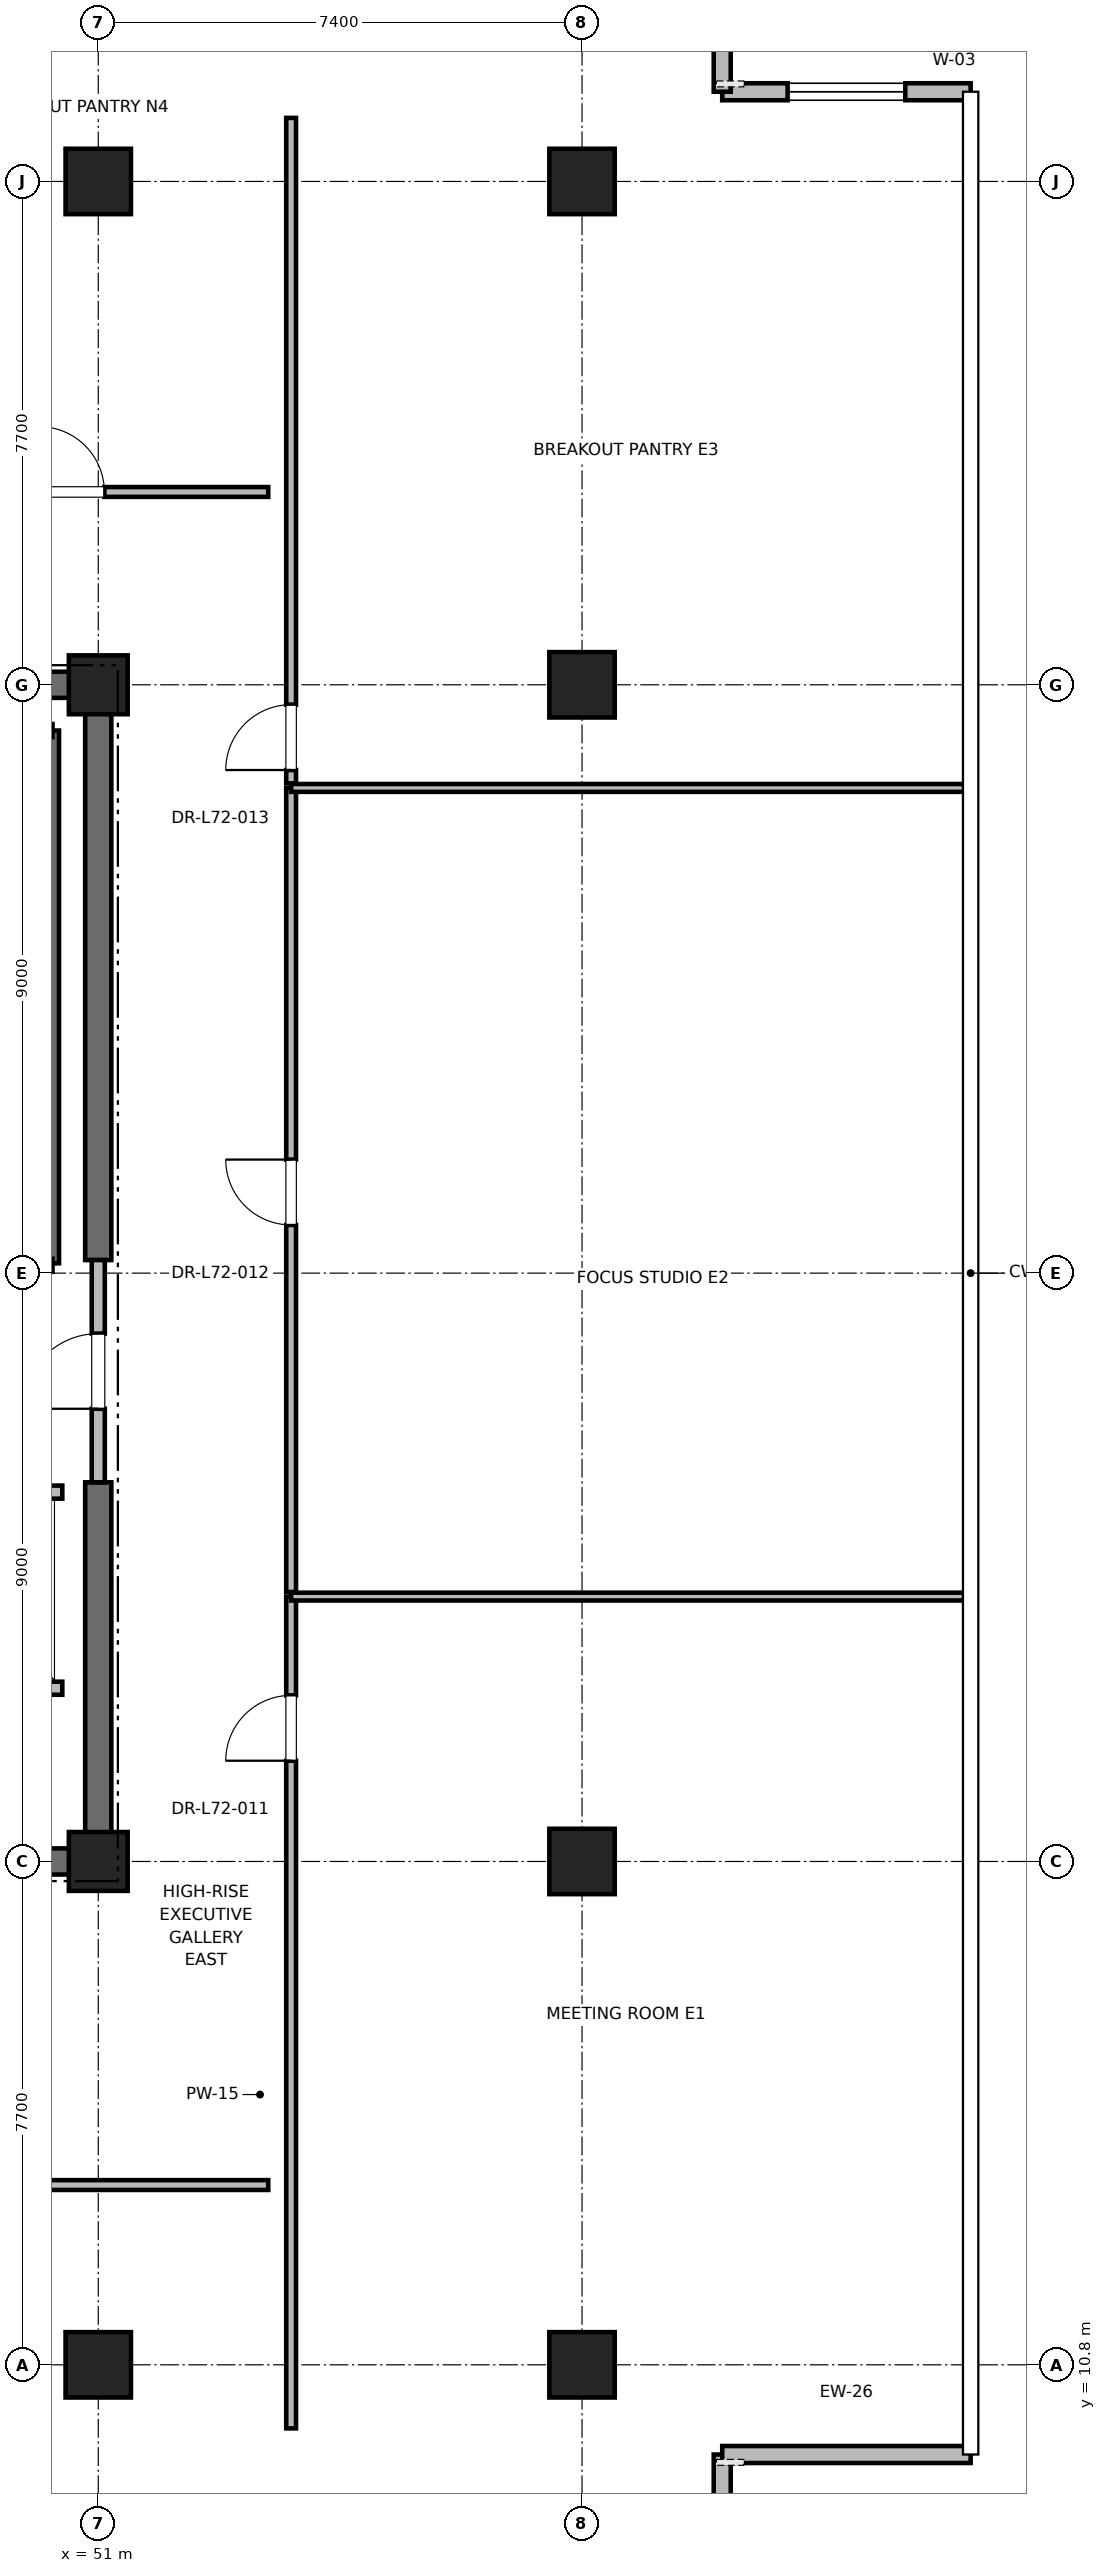
"""IFC4 building model, lengths in metres.
Left out: names, types, materials, properties, quantities, classifications, styles, units other than length and angle.
Written with IfcOpenShell. Run it as: python <this file> out.ifc"""

import sys

from ifc_helpers import new_model, si_unit, direction, frame, frame_2d, origin, origin_2d, place, context, subcontext, project, spatial, rectangle, extrude, element, fill, save


model = new_model("IFC4")
c1 = context("Model", 3, precision=1e-05, world=origin(), true_north=direction((0.0, 1.0)))
c2 = subcontext(c1, "Body", "Model", "MODEL_VIEW")
j1 = project(units=[si_unit("LENGTHUNIT", "METRE"), si_unit("PLANEANGLEUNIT", "RADIAN")], contexts=[c1])
p1 = place(None, origin())
s1 = spatial("IfcSite", under=j1, at=p1, CompositionType="ELEMENT")
p2 = place(p1, origin())
s2 = spatial("IfcBuilding", under=s1, at=p2, CompositionType="ELEMENT")
p3 = place(p2, frame((0.0, 0.0, 310.8)))
s3 = spatial("IfcBuildingStorey", under=s2, at=p3, CompositionType="ELEMENT", Elevation=310.8)
for number, where, z_axis, x_axis in (
    (1, (51.0, 10.8, 0.0), (0.0, 0.0, 1.0), (1.0, 0.0, 0.0)),
    (2, (51.0, 44.2, 0.0), (0.0, 0.0, 1.0), (1.0, 0.0, 0.0)),
    (3, (58.4, 18.5, 0.0), (0.0, 0.0, 1.0), (1.0, 0.0, 0.0)),
    (4, (58.4, 36.5, 0.0), (0.0, 0.0, 1.0), (1.0, 0.0, 0.0)),
    (5, (58.4, 10.8, 0.0), (0.0, 0.0, 1.0), (1.0, 0.0, 0.0)),
    (6, (58.4, 44.2, 0.0), (0.0, 0.0, 1.0), (1.0, 0.0, 0.0)),
):
    element("IfcColumn", number, at=place(p3, frame(where, z_axis=z_axis, x_axis=x_axis)), inside=s3, PredefinedType="COLUMN", context=c2, shape_type="SweptSolid", body=[
        extrude(rectangle(XDim=1.0, YDim=1.0, at=origin_2d()), origin(), (0.0, 0.0, 1.0), 4.0),
    ])
for number, where, z_axis, x_axis in (
    (7, (51.0, 18.5, 0.0), (0.0, 0.0, 1.0), (1.0, 0.0, 0.0)),
    (8, (51.0, 36.5, 0.0), (0.0, 0.0, 1.0), (1.0, 0.0, 0.0)),
):
    element("IfcColumn", number, at=place(p3, frame(where, z_axis=z_axis, x_axis=x_axis)), inside=s3, PredefinedType="PILASTER", context=c2, shape_type="SweptSolid", body=[
        extrude(rectangle(XDim=0.9, YDim=0.9, at=origin_2d()), origin(), (0.0, 0.0, 1.0), 4.0),
    ])
p4 = place(p3, frame((41.8, 18.5, 0.0), z_axis=(0.0, 0.0, 1.0), x_axis=(1.0, 0.0, 0.0)))
e9 = element("IfcWall", 9, at=p4, inside=s3, PredefinedType="SHEAR", context=c2, shape_type="SweptSolid", body=[
    extrude(rectangle(XDim=9.2, YDim=0.4, at=frame_2d((4.6, 0.0))), origin(), (0.0, 0.0, 1.0), 3.785),
])
for number, where, z_axis, x_axis in (
    (10, (45.2, 36.5, 0.0), (0.0, 0.0, 1.0), (1.0, 0.0, 0.0)),
    (11, (51.0, 18.5, 0.0), (0.0, 0.0, 1.0), (0.0, 1.0, 0.0)),
):
    element("IfcWall", number, at=place(p3, frame(where, z_axis=z_axis, x_axis=x_axis)), inside=s3, PredefinedType="SHEAR", context=c2, shape_type="SweptSolid", body=[
        extrude(rectangle(XDim=5.8, YDim=0.4, at=frame_2d((2.9, 0.0))), origin(), (0.0, 0.0, 1.0), 3.785),
    ])
p5 = place(p3, frame((51.0, 27.7, 0.0), z_axis=(0.0, 0.0, 1.0), x_axis=(0.0, 1.0, 0.0)))
e12 = element("IfcWall", 12, at=p5, inside=s3, PredefinedType="SHEAR", context=c2, shape_type="SweptSolid", body=[
    extrude(rectangle(XDim=8.8, YDim=0.4, at=frame_2d((4.4, 0.0))), origin(), (0.0, 0.0, 1.0), 3.785),
])
p6 = place(p3, frame((60.544, 6.128, 0.0), z_axis=(0.0, 0.0, 1.0), x_axis=(0.0, 1.0, 0.0)))
e13 = element("IfcWall", 13, at=p6, inside=s3, PredefinedType="PARAPET", context=c2, shape_type="SweptSolid", body=[
    extrude(rectangle(XDim=3.3, YDim=0.26, at=frame_2d((1.65, 0.0))), origin(), (0.0, 0.0, 1.0), 3.785),
])
p7 = place(p6, frame((0.75, 0.0, 0.85)))
e14 = element("IfcOpeningElement", 14, at=p7, cuts=e13, PredefinedType="OPENING", context=c2, shape_type="SweptSolid", body=[
    extrude(rectangle(XDim=1.8, YDim=2.2, at=frame_2d((0.9, 1.1))), frame((0.0, 0.13, 0.0), z_axis=(0.0, -1.0, 0.0), x_axis=(1.0, 0.0, 0.0)), (0.0, 0.0, 1.0), 0.26),
])
p8 = place(p3, frame((60.544, 9.428, 0.0), z_axis=(0.0, 0.0, 1.0), x_axis=(1.0, 0.0, 0.0)))
e15 = element("IfcWall", 15, at=p8, inside=s3, PredefinedType="PARAPET", context=c2, shape_type="SweptSolid", body=[
    extrude(rectangle(XDim=3.8, YDim=0.26, at=frame_2d((1.9, 0.0))), origin(), (0.0, 0.0, 1.0), 3.785),
])
p9 = place(p3, frame((64.344, 45.572, 0.0), z_axis=(0.0, 0.0, 1.0), x_axis=(-1.0, 0.0, 0.0)))
e16 = element("IfcWall", 16, at=p9, inside=s3, PredefinedType="PARAPET", context=c2, shape_type="SweptSolid", body=[
    extrude(rectangle(XDim=3.8, YDim=0.26, at=frame_2d((1.9, 0.0))), origin(), (0.0, 0.0, 1.0), 3.785),
])
p10 = place(p9, frame((1.0, 0.0, 0.85)))
e17 = element("IfcOpeningElement", 17, at=p10, cuts=e16, PredefinedType="OPENING", context=c2, shape_type="SweptSolid", body=[
    extrude(rectangle(XDim=1.8, YDim=2.2, at=frame_2d((0.9, 1.1))), frame((0.0, 0.13, 0.0), z_axis=(0.0, -1.0, 0.0), x_axis=(1.0, 0.0, 0.0)), (0.0, 0.0, 1.0), 0.26),
])
p11 = place(p3, frame((60.544, 45.572, 0.0), z_axis=(0.0, 0.0, 1.0), x_axis=(0.0, 1.0, 0.0)))
e18 = element("IfcWall", 18, at=p11, inside=s3, PredefinedType="PARAPET", context=c2, shape_type="SweptSolid", body=[
    extrude(rectangle(XDim=3.3, YDim=0.26, at=frame_2d((1.65, 0.0))), origin(), (0.0, 0.0, 1.0), 3.785),
])
p12 = place(p3, frame((50.3, 27.65, 0.0), z_axis=(0.0, 0.0, 1.0), x_axis=(0.0, 1.0, 0.0)))
e19 = element("IfcWall", 19, at=p12, inside=s3, PredefinedType="SOLIDWALL", context=c2, shape_type="SweptSolid", body=[
    extrude(rectangle(XDim=8.15, YDim=0.2, at=frame_2d((4.075, 0.0))), origin(), (0.0, 0.0, 1.0), 3.785),
])
p13 = place(p3, frame((51.0, 24.3, 0.0), z_axis=(0.0, 0.0, 1.0), x_axis=(0.0, 1.0, 0.0)))
e20 = element("IfcWall", 20, at=p13, inside=s3, PredefinedType="PARTITIONING", context=c2, shape_type="SweptSolid", body=[
    extrude(rectangle(XDim=3.4, YDim=0.2, at=frame_2d((1.7, 0.0))), origin(), (0.0, 0.0, 1.0), 2.865),
])
p14 = place(p13, frame((1.125, 0.0, 0.0)))
e21 = element("IfcOpeningElement", 21, at=p14, cuts=e20, PredefinedType="OPENING", context=c2, shape_type="SweptSolid", body=[
    extrude(rectangle(XDim=1.15, YDim=2.2, at=frame_2d((0.575, 1.1))), frame((0.0, 0.1, 0.0), z_axis=(0.0, -1.0, 0.0), x_axis=(1.0, 0.0, 0.0)), (0.0, 0.0, 1.0), 0.2),
])
p15 = place(p3, frame((47.85, 21.15, 0.0), z_axis=(0.0, 0.0, 1.0), x_axis=(1.0, 0.0, 0.0)))
e22 = element("IfcWall", 22, at=p15, inside=s3, PredefinedType="SOLIDWALL", context=c2, shape_type="SweptSolid", body=[
    extrude(rectangle(XDim=2.6, YDim=0.2, at=frame_2d((1.3, 0.0))), origin(), (0.0, 0.0, 1.0), 3.785),
])
p16 = place(p3, frame((50.45, 24.15, 0.0), z_axis=(0.0, 0.0, 1.0), x_axis=(-1.0, 0.0, 0.0)))
e23 = element("IfcWall", 23, at=p16, inside=s3, PredefinedType="SOLIDWALL", context=c2, shape_type="SweptSolid", body=[
    extrude(rectangle(XDim=2.6, YDim=0.2, at=frame_2d((1.3, 0.0))), origin(), (0.0, 0.0, 1.0), 2.865),
])
p17 = place(p16, frame((0.75, 0.0, 0.0)))
e24 = element("IfcOpeningElement", 24, at=p17, cuts=e23, PredefinedType="OPENING", context=c2, shape_type="SweptSolid", body=[
    extrude(rectangle(XDim=1.1, YDim=2.2, at=frame_2d((0.55, 1.1))), frame((0.0, 0.1, 0.0), z_axis=(0.0, -1.0, 0.0), x_axis=(1.0, 0.0, 0.0)), (0.0, 0.0, 1.0), 0.2),
])
p18 = place(p3, frame((47.686, 39.45, 0.0), z_axis=(0.0, 0.0, 1.0), x_axis=(1.0, 0.0, 0.0)))
e25 = element("IfcWall", 25, at=p18, inside=s3, PredefinedType="PARTITIONING", context=c2, shape_type="SweptSolid", body=[
    extrude(rectangle(XDim=5.914, YDim=0.15, at=frame_2d((2.957, 0.0))), origin(), (0.0, 0.0, 1.0), 2.85),
])
p19 = place(p18, frame((2.407, 0.0, 0.0)))
e26 = element("IfcOpeningElement", 26, at=p19, cuts=e25, PredefinedType="OPENING", context=c2, shape_type="SweptSolid", body=[
    extrude(rectangle(XDim=1.0, YDim=2.15, at=frame_2d((0.5, 1.075))), frame((0.0, 0.075, 0.0), z_axis=(0.0, -1.0, 0.0), x_axis=(1.0, 0.0, 0.0)), (0.0, 0.0, 1.0), 0.15),
])
p20 = place(p3, frame((38.438, 13.55, 0.0), z_axis=(0.0, 0.0, 1.0), x_axis=(1.0, 0.0, 0.0)))
e27 = element("IfcWall", 27, at=p20, inside=s3, PredefinedType="PARTITIONING", context=c2, shape_type="SweptSolid", body=[
    extrude(rectangle(XDim=15.162, YDim=0.15, at=frame_2d((7.581, 0.0))), origin(), (0.0, 0.0, 1.0), 2.85),
])
p21 = place(p20, frame((7.031, 0.0, 0.0)))
e28 = element("IfcOpeningElement", 28, at=p21, cuts=e27, PredefinedType="OPENING", context=c2, shape_type="SweptSolid", body=[
    extrude(rectangle(XDim=1.0, YDim=2.15, at=frame_2d((0.5, 1.075))), frame((0.0, 0.075, 0.0), z_axis=(0.0, -1.0, 0.0), x_axis=(1.0, 0.0, 0.0)), (0.0, 0.0, 1.0), 0.15),
])
p22 = place(p3, frame((53.95, 9.828, 0.0), z_axis=(0.0, 0.0, 1.0), x_axis=(0.0, 1.0, 0.0)))
e29 = element("IfcWall", 29, at=p22, inside=s3, PredefinedType="PARTITIONING", context=c2, shape_type="SweptSolid", body=[
    extrude(rectangle(XDim=12.724, YDim=0.15, at=frame_2d((6.362, 0.0))), origin(), (0.0, 0.0, 1.0), 2.85),
])
p23 = place(p22, frame((10.213, 0.0, 0.0)))
e30 = element("IfcOpeningElement", 30, at=p23, cuts=e29, PredefinedType="OPENING", context=c2, shape_type="SweptSolid", body=[
    extrude(rectangle(XDim=1.0, YDim=2.15, at=frame_2d((0.5, 1.075))), frame((0.0, 0.075, 0.0), z_axis=(0.0, -1.0, 0.0), x_axis=(1.0, 0.0, 0.0)), (0.0, 0.0, 1.0), 0.15),
])
p24 = place(p3, frame((53.95, 22.552, 0.0), z_axis=(0.0, 0.0, 1.0), x_axis=(1.0, 0.0, 0.0)))
e31 = element("IfcWall", 31, at=p24, inside=s3, PredefinedType="PARTITIONING", context=c2, shape_type="SweptSolid", body=[
    extrude(rectangle(XDim=10.294, YDim=0.12, at=frame_2d((5.147, 0.0))), origin(), (0.0, 0.0, 1.0), 2.85),
])
p25 = place(p3, frame((53.95, 22.622, 0.0), z_axis=(0.0, 0.0, 1.0), x_axis=(0.0, 1.0, 0.0)))
e32 = element("IfcWall", 32, at=p25, inside=s3, PredefinedType="PARTITIONING", context=c2, shape_type="SweptSolid", body=[
    extrude(rectangle(XDim=12.301, YDim=0.15, at=frame_2d((6.15, 0.0))), origin(), (0.0, 0.0, 1.0), 2.85),
])
p26 = place(p25, frame((5.615, 0.0, 0.0)))
e33 = element("IfcOpeningElement", 33, at=p26, cuts=e32, PredefinedType="OPENING", context=c2, shape_type="SweptSolid", body=[
    extrude(rectangle(XDim=1.0, YDim=2.15, at=frame_2d((0.5, 1.075))), frame((0.0, 0.075, 0.0), z_axis=(0.0, -1.0, 0.0), x_axis=(1.0, 0.0, 0.0)), (0.0, 0.0, 1.0), 0.15),
])
p27 = place(p3, frame((53.95, 34.922, 0.0), z_axis=(0.0, 0.0, 1.0), x_axis=(1.0, 0.0, 0.0)))
e34 = element("IfcWall", 34, at=p27, inside=s3, PredefinedType="PARTITIONING", context=c2, shape_type="SweptSolid", body=[
    extrude(rectangle(XDim=10.294, YDim=0.12, at=frame_2d((5.147, 0.0))), origin(), (0.0, 0.0, 1.0), 2.85),
])
p28 = place(p3, frame((53.95, 34.992, 0.0), z_axis=(0.0, 0.0, 1.0), x_axis=(0.0, 1.0, 0.0)))
e35 = element("IfcWall", 35, at=p28, inside=s3, PredefinedType="PARTITIONING", context=c2, shape_type="SweptSolid", body=[
    extrude(rectangle(XDim=10.18, YDim=0.15, at=frame_2d((5.09, 0.0))), origin(), (0.0, 0.0, 1.0), 2.85),
])
p29 = place(p28, frame((0.204, 0.0, 0.0)))
e36 = element("IfcOpeningElement", 36, at=p29, cuts=e35, PredefinedType="OPENING", context=c2, shape_type="SweptSolid", body=[
    extrude(rectangle(XDim=1.0, YDim=2.15, at=frame_2d((0.5, 1.075))), frame((0.0, 0.075, 0.0), z_axis=(0.0, -1.0, 0.0), x_axis=(1.0, 0.0, 0.0)), (0.0, 0.0, 1.0), 0.15),
])
p30 = place(p10, origin())
e37 = element("IfcWindow", 37, at=p30, inside=s3, PartitioningType="SINGLE_PANEL", PredefinedType="WINDOW", context=c2, shape_type="SweptSolid", body=[
    extrude(rectangle(XDim=1.8, YDim=2.2, at=frame_2d((0.9, 1.1))), frame((0.0, 0.03, 0.0), z_axis=(0.0, -1.0, 0.0), x_axis=(1.0, 0.0, 0.0)), (0.0, 0.0, 1.0), 0.06),
])
fill(e17, e37)
p31 = place(p14, origin())
e38 = element("IfcDoor", 38, at=p31, inside=s3, OperationType="SINGLE_SWING_LEFT", PredefinedType="DOOR", context=c2, shape_type="SweptSolid", body=[
    extrude(rectangle(XDim=1.15, YDim=2.2, at=frame_2d((0.575, 1.1))), frame((0.0, 0.025, 0.0), z_axis=(0.0, -1.0, 0.0), x_axis=(1.0, 0.0, 0.0)), (0.0, 0.0, 1.0), 0.05),
])
fill(e21, e38)
p32 = place(p19, origin())
e39 = element("IfcDoor", 39, at=p32, inside=s3, OperationType="SINGLE_SWING_LEFT", PredefinedType="DOOR", context=c2, shape_type="SweptSolid", body=[
    extrude(rectangle(XDim=1.0, YDim=2.15, at=frame_2d((0.5, 1.075))), frame((0.0, 0.025, 0.0), z_axis=(0.0, -1.0, 0.0), x_axis=(1.0, 0.0, 0.0)), (0.0, 0.0, 1.0), 0.05),
])
fill(e26, e39)
p33 = place(p23, origin())
e40 = element("IfcDoor", 40, at=p33, inside=s3, OperationType="SINGLE_SWING_LEFT", PredefinedType="DOOR", context=c2, shape_type="SweptSolid", body=[
    extrude(rectangle(XDim=1.0, YDim=2.15, at=frame_2d((0.5, 1.075))), frame((0.0, 0.025, 0.0), z_axis=(0.0, -1.0, 0.0), x_axis=(1.0, 0.0, 0.0)), (0.0, 0.0, 1.0), 0.05),
])
fill(e30, e40)
p34 = place(p26, origin())
e41 = element("IfcDoor", 41, at=p34, inside=s3, OperationType="SINGLE_SWING_RIGHT", PredefinedType="DOOR", context=c2, shape_type="SweptSolid", body=[
    extrude(rectangle(XDim=1.0, YDim=2.15, at=frame_2d((0.5, 1.075))), frame((0.0, 0.025, 0.0), z_axis=(0.0, -1.0, 0.0), x_axis=(1.0, 0.0, 0.0)), (0.0, 0.0, 1.0), 0.05),
])
fill(e33, e41)
p35 = place(p29, origin())
e42 = element("IfcDoor", 42, at=p35, inside=s3, OperationType="SINGLE_SWING_LEFT", PredefinedType="DOOR", context=c2, shape_type="SweptSolid", body=[
    extrude(rectangle(XDim=1.0, YDim=2.15, at=frame_2d((0.5, 1.075))), frame((0.0, 0.025, 0.0), z_axis=(0.0, -1.0, 0.0), x_axis=(1.0, 0.0, 0.0)), (0.0, 0.0, 1.0), 0.05),
])
fill(e36, e42)
save(model, sys.argv[1])
